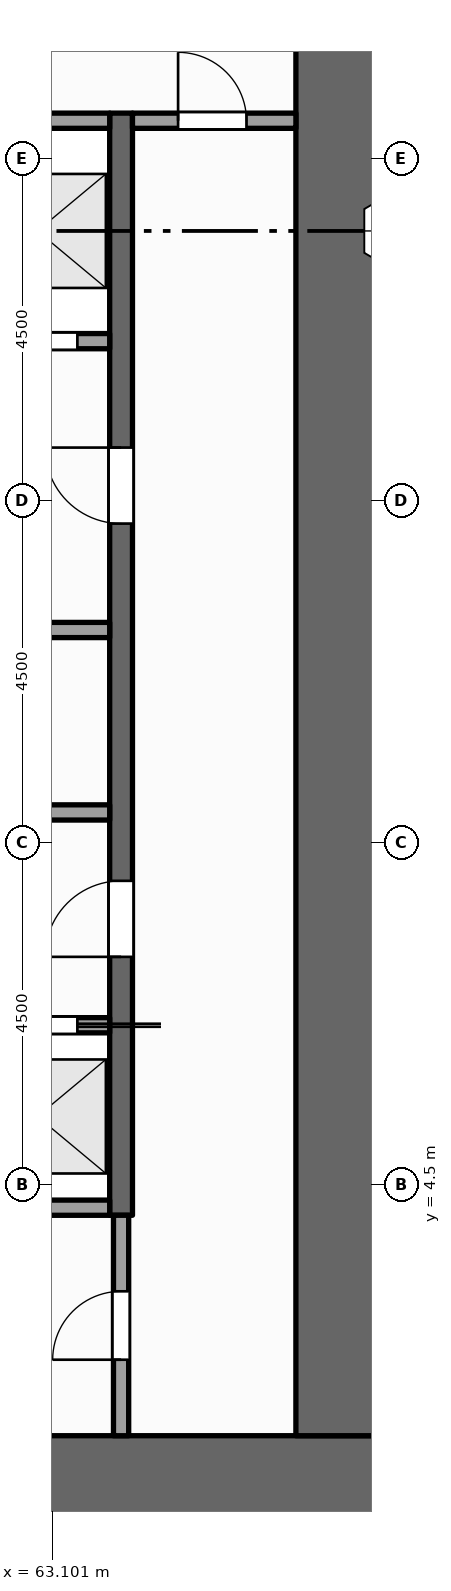
"""IFC4 building model, lengths in metres.
Left out: names, types, materials, properties, quantities, classifications, styles, units other than length and angle.
Written with IfcOpenShell. Run it as: python <this file> out.ifc"""

import sys

from ifc_helpers import new_model, si_unit, direction, frame, frame_2d, origin, place, context, subcontext, project, spatial, rectangle, extrude, element, fill, save


model = new_model("IFC4")
c1 = context("Model", 3, precision=1e-05, world=origin(), true_north=direction((0.0, 1.0)))
c2 = subcontext(c1, "Body", "Model", "MODEL_VIEW")
j1 = project(units=[si_unit("LENGTHUNIT", "METRE"), si_unit("PLANEANGLEUNIT", "RADIAN")], contexts=[c1])
p1 = place(None, origin())
s1 = spatial("IfcSite", under=j1, at=p1, CompositionType="ELEMENT")
p2 = place(p1, origin())
s2 = spatial("IfcBuilding", under=s1, at=p2, CompositionType="ELEMENT")
p3 = place(p2, frame((0.0, 0.0, 61.0)))
s3 = spatial("IfcBuildingStorey", under=s2, at=p3, CompositionType="ELEMENT", Elevation=61.0)
p4 = place(p3, frame((67.5, 0.6, -0.15), z_axis=(0.0, 0.0, 1.0), x_axis=(-1.0, 0.0, 0.0)))
e1 = element("IfcWall", 1, at=p4, inside=s3, PredefinedType="SHEAR", context=c2, shape_type="SweptSolid", body=[
    extrude(rectangle(XDim=13.5, YDim=1.2, at=frame_2d((6.75, 0.0))), origin(), (0.0, 0.0, 1.0), 4.0),
])
p5 = place(p3, frame((66.9, 1.2, -0.15), z_axis=(0.0, 0.0, 1.0), x_axis=(0.0, 1.0, 0.0)))
e2 = element("IfcWall", 2, at=p5, inside=s3, PredefinedType="SHEAR", context=c2, shape_type="SweptSolid", body=[
    extrude(rectangle(XDim=20.1, YDim=1.2, at=frame_2d((10.05, 0.0))), origin(), (0.0, 0.0, 1.0), 4.0),
])
p6 = place(p3, frame((64.0, 1.2, 0.0), z_axis=(0.0, 0.0, 1.0), x_axis=(0.0, 1.0, 0.0)))
e3 = element("IfcWall", 3, at=p6, inside=s3, PredefinedType="PARTITIONING", context=c2, shape_type="SweptSolid", body=[
    extrude(rectangle(XDim=2.9, YDim=0.2, at=frame_2d((1.45, 0.0))), origin(), (0.0, 0.0, 1.0), 3.85),
])
p7 = place(p6, frame((1.0, 0.0, 0.0)))
e4 = element("IfcOpeningElement", 4, at=p7, cuts=e3, PredefinedType="OPENING", context=c2, shape_type="SweptSolid", body=[
    extrude(rectangle(XDim=0.9, YDim=2.1, at=frame_2d((0.45, 1.05))), frame((0.0, 0.11, 0.0), z_axis=(0.0, -1.0, 0.0), x_axis=(1.0, 0.0, 0.0)), (0.0, 0.0, 1.0), 0.22),
])
p8 = place(p3, frame((64.0, 4.1, 0.0), z_axis=(0.0, 0.0, 1.0), x_axis=(0.0, 1.0, 0.0)))
e5 = element("IfcWall", 5, at=p8, inside=s3, PredefinedType="SHEAR", context=c2, shape_type="SweptSolid", body=[
    extrude(rectangle(XDim=14.5, YDim=0.3, at=frame_2d((7.25, 0.0))), origin(), (0.0, 0.0, 1.0), 3.85),
])
p9 = place(p8, frame((3.4, 0.0, 0.0)))
e6 = element("IfcOpeningElement", 6, at=p9, cuts=e5, PredefinedType="OPENING", context=c2, shape_type="SweptSolid", body=[
    extrude(rectangle(XDim=1.0, YDim=2.1, at=frame_2d((0.5, 1.05))), frame((0.0, 0.16, 0.0), z_axis=(0.0, -1.0, 0.0), x_axis=(1.0, 0.0, 0.0)), (0.0, 0.0, 1.0), 0.32),
])
p10 = place(p8, frame((9.1, 0.0, 0.0)))
e7 = element("IfcOpeningElement", 7, at=p10, cuts=e5, PredefinedType="OPENING", context=c2, shape_type="SweptSolid", body=[
    extrude(rectangle(XDim=1.0, YDim=2.1, at=frame_2d((0.5, 1.05))), frame((0.0, 0.16, 0.0), z_axis=(0.0, -1.0, 0.0), x_axis=(1.0, 0.0, 0.0)), (0.0, 0.0, 1.0), 0.32),
])
p11 = place(p3, frame((61.9, 4.2, 0.0), z_axis=(0.0, 0.0, 1.0), x_axis=(1.0, 0.0, 0.0)))
e8 = element("IfcWall", 8, at=p11, inside=s3, PredefinedType="SOLIDWALL", context=c2, shape_type="SweptSolid", body=[
    extrude(rectangle(XDim=1.95, YDim=0.2, at=frame_2d((0.975, 0.0))), origin(), (0.0, 0.0, 1.0), 3.85),
])
p12 = place(p3, frame((61.9, 6.6, 0.0), z_axis=(0.0, 0.0, 1.0), x_axis=(1.0, 0.0, 0.0)))
e9 = element("IfcWall", 9, at=p12, inside=s3, PredefinedType="SOLIDWALL", context=c2, shape_type="SweptSolid", body=[
    extrude(rectangle(XDim=1.95, YDim=0.2, at=frame_2d((0.975, 0.0))), origin(), (0.0, 0.0, 1.0), 3.85),
])
p13 = place(p12, frame((0.425, 0.0, 0.012)))
e10 = element("IfcOpeningElement", 10, at=p13, cuts=e9, PredefinedType="OPENING", context=c2, shape_type="SweptSolid", body=[
    extrude(rectangle(XDim=1.1, YDim=2.1, at=frame_2d((0.55, 1.05))), frame((0.0, 0.11, 0.0), z_axis=(0.0, -1.0, 0.0), x_axis=(1.0, 0.0, 0.0)), (0.0, 0.0, 1.0), 0.22),
])
p14 = place(p3, frame((55.2, 9.4, 0.0), z_axis=(0.0, 0.0, 1.0), x_axis=(1.0, 0.0, 0.0)))
e11 = element("IfcWall", 11, at=p14, inside=s3, PredefinedType="PARTITIONING", context=c2, shape_type="SweptSolid", body=[
    extrude(rectangle(XDim=8.65, YDim=0.2, at=frame_2d((4.325, 0.0))), origin(), (0.0, 0.0, 1.0), 3.85),
])
p15 = place(p14, frame((3.875, 0.0, 0.0)))
e12 = element("IfcOpeningElement", 12, at=p15, cuts=e11, PredefinedType="OPENING", context=c2, shape_type="SweptSolid", body=[
    extrude(rectangle(XDim=0.9, YDim=2.1, at=frame_2d((0.45, 1.05))), frame((0.0, 0.11, 0.0), z_axis=(0.0, -1.0, 0.0), x_axis=(1.0, 0.0, 0.0)), (0.0, 0.0, 1.0), 0.22),
])
p16 = place(p3, frame((59.7, 11.8, 0.0), z_axis=(0.0, 0.0, 1.0), x_axis=(1.0, 0.0, 0.0)))
e13 = element("IfcWall", 13, at=p16, inside=s3, PredefinedType="PARTITIONING", context=c2, shape_type="SweptSolid", body=[
    extrude(rectangle(XDim=4.15, YDim=0.2, at=frame_2d((2.075, 0.0))), origin(), (0.0, 0.0, 1.0), 3.85),
])
p17 = place(p3, frame((61.9, 15.6, 0.0), z_axis=(0.0, 0.0, 1.0), x_axis=(1.0, 0.0, 0.0)))
e14 = element("IfcWall", 14, at=p17, inside=s3, PredefinedType="SOLIDWALL", context=c2, shape_type="SweptSolid", body=[
    extrude(rectangle(XDim=1.95, YDim=0.2, at=frame_2d((0.975, 0.0))), origin(), (0.0, 0.0, 1.0), 3.85),
])
p18 = place(p17, frame((0.425, 0.0, 0.012)))
e15 = element("IfcOpeningElement", 15, at=p18, cuts=e14, PredefinedType="OPENING", context=c2, shape_type="SweptSolid", body=[
    extrude(rectangle(XDim=1.1, YDim=2.1, at=frame_2d((0.55, 1.05))), frame((0.0, 0.11, 0.0), z_axis=(0.0, -1.0, 0.0), x_axis=(1.0, 0.0, 0.0)), (0.0, 0.0, 1.0), 0.22),
])
p19 = place(p3, frame((61.9, 18.5, 0.0), z_axis=(0.0, 0.0, 1.0), x_axis=(1.0, 0.0, 0.0)))
e16 = element("IfcWall", 16, at=p19, inside=s3, PredefinedType="SOLIDWALL", context=c2, shape_type="SweptSolid", body=[
    extrude(rectangle(XDim=1.95, YDim=0.2, at=frame_2d((0.975, 0.0))), origin(), (0.0, 0.0, 1.0), 3.85),
])
p20 = place(p3, frame((64.15, 18.5, 0.0), z_axis=(0.0, 0.0, 1.0), x_axis=(1.0, 0.0, 0.0)))
e17 = element("IfcWall", 17, at=p20, inside=s3, PredefinedType="PARTITIONING", context=c2, shape_type="SweptSolid", body=[
    extrude(rectangle(XDim=2.15, YDim=0.2, at=frame_2d((1.075, 0.0))), origin(), (0.0, 0.0, 1.0), 3.85),
])
p21 = place(p20, frame((0.6, 0.0, 0.0)))
e18 = element("IfcOpeningElement", 18, at=p21, cuts=e17, PredefinedType="OPENING", context=c2, shape_type="SweptSolid", body=[
    extrude(rectangle(XDim=0.9, YDim=2.1, at=frame_2d((0.45, 1.05))), frame((0.0, 0.11, 0.0), z_axis=(0.0, -1.0, 0.0), x_axis=(1.0, 0.0, 0.0)), (0.0, 0.0, 1.0), 0.22),
])
p22 = place(p13, origin())
e19 = element("IfcDoor", 19, at=p22, inside=s3, OperationType="SLIDING_TO_RIGHT", PredefinedType="DOOR", context=c2, shape_type="SweptSolid", body=[
    extrude(rectangle(XDim=1.1, YDim=2.1, at=frame_2d((0.55, 1.05))), frame((0.0, 0.025, 0.0), z_axis=(0.0, -1.0, 0.0), x_axis=(1.0, 0.0, 0.0)), (0.0, 0.0, 1.0), 0.05),
])
fill(e10, e19)
p23 = place(p18, origin())
e20 = element("IfcDoor", 20, at=p23, inside=s3, OperationType="SLIDING_TO_LEFT", PredefinedType="DOOR", context=c2, shape_type="SweptSolid", body=[
    extrude(rectangle(XDim=1.1, YDim=2.1, at=frame_2d((0.55, 1.05))), frame((0.0, 0.025, 0.0), z_axis=(0.0, -1.0, 0.0), x_axis=(1.0, 0.0, 0.0)), (0.0, 0.0, 1.0), 0.05),
])
fill(e15, e20)
p24 = place(p9, origin())
e21 = element("IfcDoor", 21, at=p24, inside=s3, OperationType="SINGLE_SWING_LEFT", PredefinedType="DOOR", context=c2, shape_type="SweptSolid", body=[
    extrude(rectangle(XDim=1.0, YDim=2.1, at=frame_2d((0.5, 1.05))), frame((0.0, 0.025, 0.0), z_axis=(0.0, -1.0, 0.0), x_axis=(1.0, 0.0, 0.0)), (0.0, 0.0, 1.0), 0.05),
])
fill(e6, e21)
p25 = place(p10, origin())
e22 = element("IfcDoor", 22, at=p25, inside=s3, OperationType="SINGLE_SWING_RIGHT", PredefinedType="DOOR", context=c2, shape_type="SweptSolid", body=[
    extrude(rectangle(XDim=1.0, YDim=2.1, at=frame_2d((0.5, 1.05))), frame((0.0, 0.025, 0.0), z_axis=(0.0, -1.0, 0.0), x_axis=(1.0, 0.0, 0.0)), (0.0, 0.0, 1.0), 0.05),
])
fill(e7, e22)
p26 = place(p7, origin())
e23 = element("IfcDoor", 23, at=p26, inside=s3, OperationType="SINGLE_SWING_LEFT", PredefinedType="DOOR", context=c2, shape_type="SweptSolid", body=[
    extrude(rectangle(XDim=0.9, YDim=2.1, at=frame_2d((0.45, 1.05))), frame((0.0, 0.025, 0.0), z_axis=(0.0, -1.0, 0.0), x_axis=(1.0, 0.0, 0.0)), (0.0, 0.0, 1.0), 0.05),
])
fill(e4, e23)
p27 = place(p21, origin())
e24 = element("IfcDoor", 24, at=p27, inside=s3, OperationType="SINGLE_SWING_LEFT", PredefinedType="DOOR", context=c2, shape_type="SweptSolid", body=[
    extrude(rectangle(XDim=0.9, YDim=2.1, at=frame_2d((0.45, 1.05))), frame((0.0, 0.025, 0.0), z_axis=(0.0, -1.0, 0.0), x_axis=(1.0, 0.0, 0.0)), (0.0, 0.0, 1.0), 0.05),
])
fill(e18, e24)
save(model, sys.argv[1])
